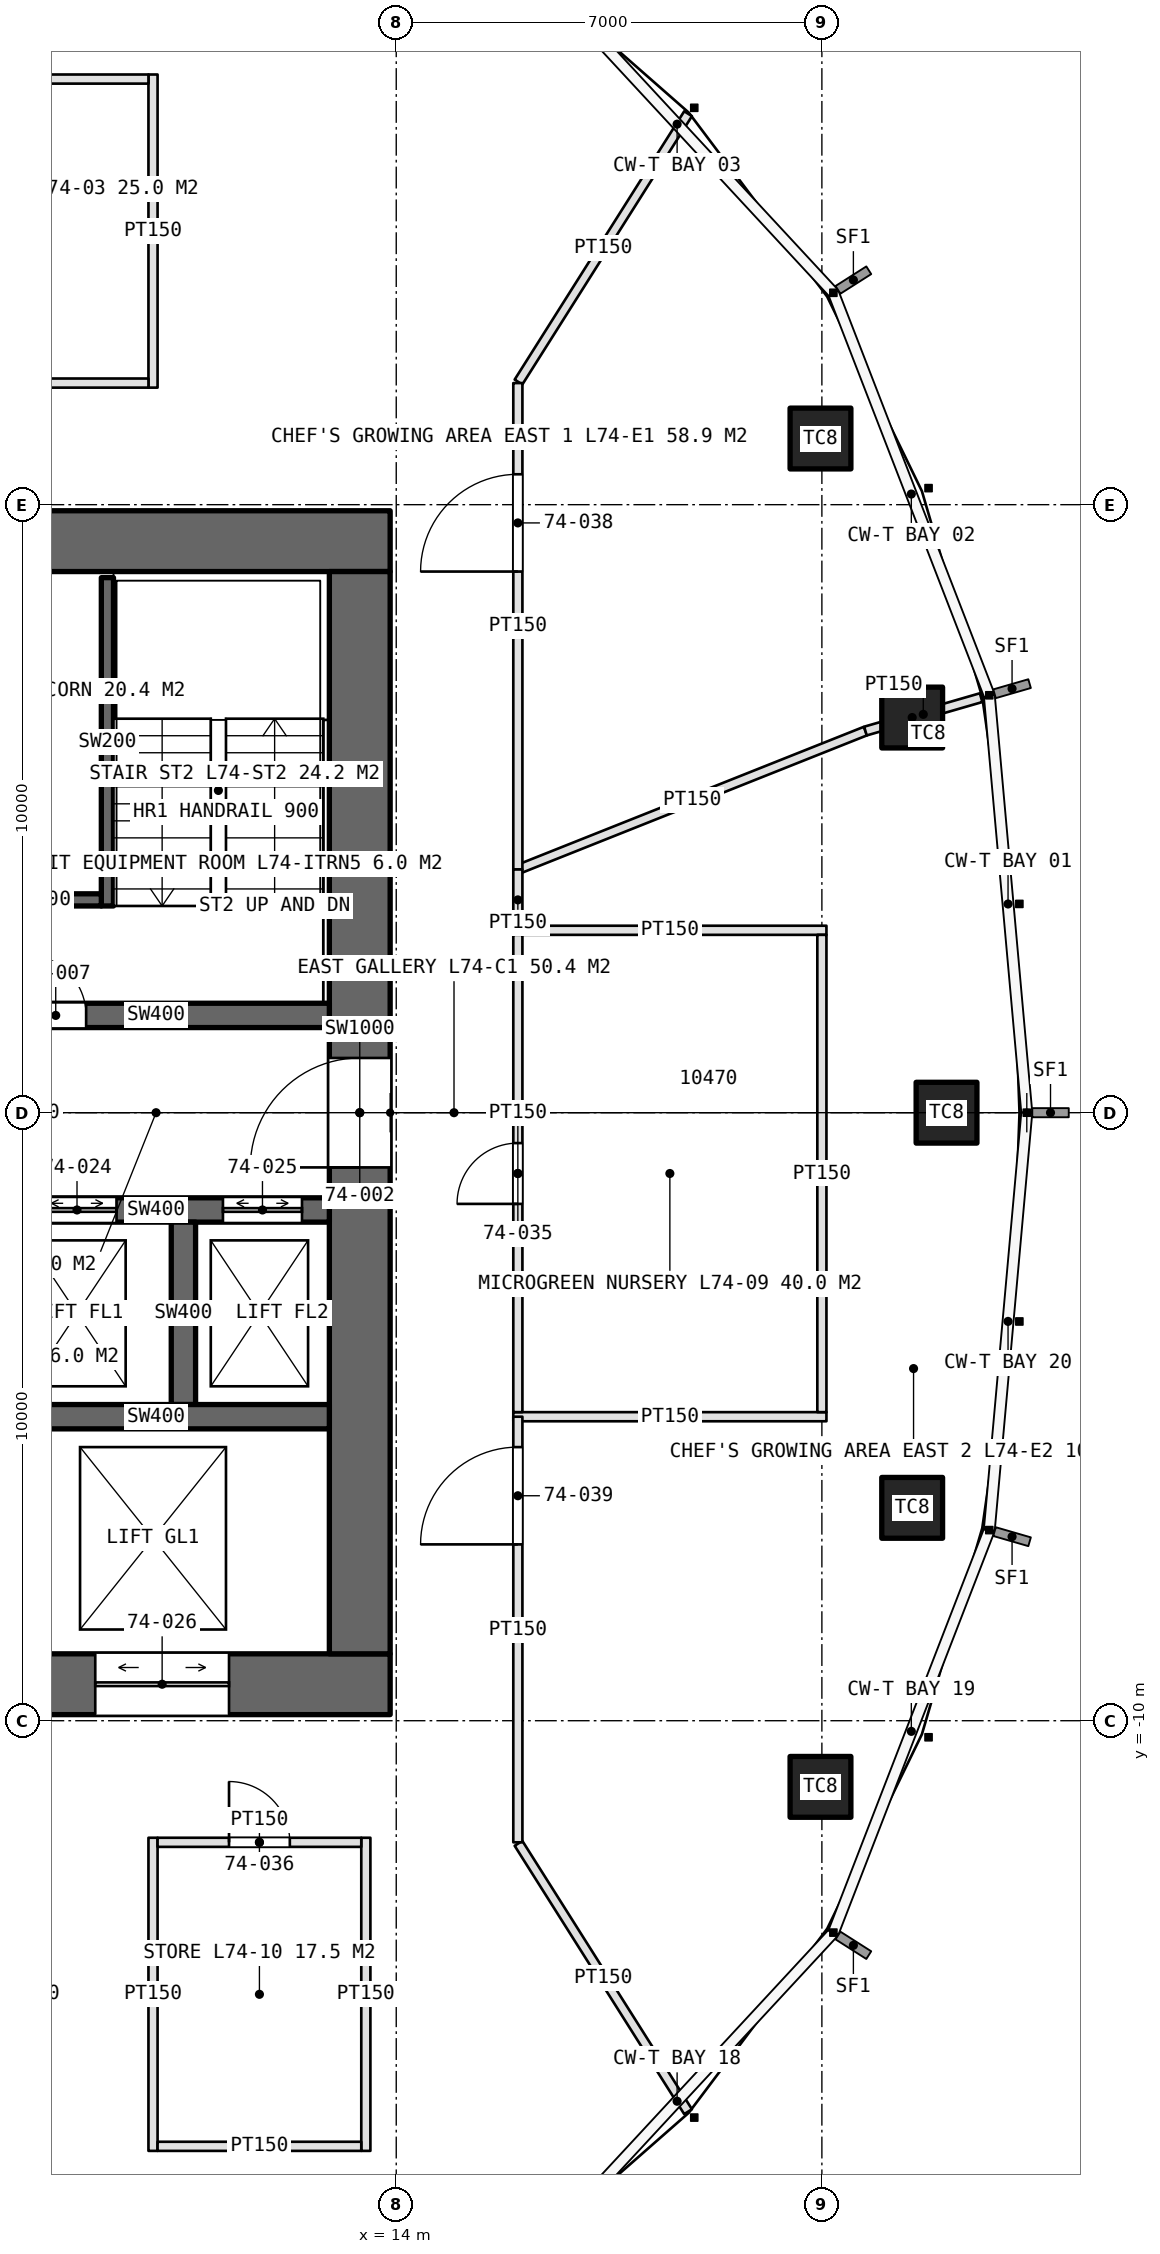
"""IFC4 building model, lengths in metres.
Left out: names, types, materials, properties, quantities, classifications, styles, units other than length and angle.
Written with IfcOpenShell. Run it as: python <this file> out.ifc"""

import sys

from ifc_helpers import new_model, si_unit, direction, frame, frame_2d, origin, origin_2d, place, context, subcontext, project, spatial, rectangle, extrude, element, fill, save


model = new_model("IFC4")
c1 = context("Model", 3, precision=1e-05, world=origin(), true_north=direction((0.0, 1.0)))
c2 = subcontext(c1, "Body", "Model", "MODEL_VIEW")
j1 = project(units=[si_unit("LENGTHUNIT", "METRE"), si_unit("PLANEANGLEUNIT", "RADIAN")], contexts=[c1])
p1 = place(None, origin())
s1 = spatial("IfcSite", under=j1, at=p1, CompositionType="ELEMENT")
p2 = place(p1, origin())
s2 = spatial("IfcBuilding", under=s1, at=p2, CompositionType="ELEMENT")
p3 = place(p2, frame((0.0, 0.0, 330.0)))
s3 = spatial("IfcBuildingStorey", under=s2, at=p3, CompositionType="ELEMENT", Elevation=330.0)
p4 = place(p3, frame((-13.9, -9.4, 0.0), z_axis=(0.0, 0.0, 1.0), x_axis=(1.0, 0.0, 0.0)))
e1 = element("IfcWall", 1, at=p4, inside=s3, PredefinedType="SHEAR", context=c2, shape_type="SweptSolid", body=[
    extrude(rectangle(XDim=27.8, YDim=1.0, at=frame_2d((13.9, 0.0))), origin(), (0.0, 0.0, 1.0), 4.2),
])
p5 = place(p4, frame((22.95, 0.0, 0.0)))
e2 = element("IfcOpeningElement", 2, at=p5, cuts=e1, PredefinedType="OPENING", context=c2, shape_type="SweptSolid", body=[
    extrude(rectangle(XDim=2.2, YDim=2.7, at=frame_2d((1.1, 1.35))), frame((0.0, 0.51, 0.0), z_axis=(0.0, -1.0, 0.0), x_axis=(1.0, 0.0, 0.0)), (0.0, 0.0, 1.0), 1.02),
])
p6 = place(p3, frame((13.9, 9.4, 0.0), z_axis=(0.0, 0.0, 1.0), x_axis=(-1.0, 0.0, 0.0)))
e3 = element("IfcWall", 3, at=p6, inside=s3, PredefinedType="SHEAR", context=c2, shape_type="SweptSolid", body=[
    extrude(rectangle(XDim=27.8, YDim=1.0, at=frame_2d((13.9, 0.0))), origin(), (0.0, 0.0, 1.0), 4.2),
])
p7 = place(p6, frame((23.9, 0.0, 0.0)))
e4 = element("IfcOpeningElement", 4, at=p7, cuts=e3, PredefinedType="OPENING", context=c2, shape_type="SweptSolid", body=[
    extrude(rectangle(XDim=1.0, YDim=2.4, at=frame_2d((0.5, 1.2))), frame((0.0, 0.51, 0.0), z_axis=(0.0, -1.0, 0.0), x_axis=(1.0, 0.0, 0.0)), (0.0, 0.0, 1.0), 1.02),
])
p8 = place(p6, frame((13.0, 0.0, 0.0)))
e5 = element("IfcOpeningElement", 5, at=p8, cuts=e3, PredefinedType="OPENING", context=c2, shape_type="SweptSolid", body=[
    extrude(rectangle(XDim=1.8, YDim=2.4, at=frame_2d((0.9, 1.2))), frame((0.0, 0.51, 0.0), z_axis=(0.0, -1.0, 0.0), x_axis=(1.0, 0.0, 0.0)), (0.0, 0.0, 1.0), 1.02),
])
p9 = place(p3, frame((13.4, -8.9, 0.0), z_axis=(0.0, 0.0, 1.0), x_axis=(0.0, 1.0, 0.0)))
e6 = element("IfcWall", 6, at=p9, inside=s3, PredefinedType="SHEAR", context=c2, shape_type="SweptSolid", body=[
    extrude(rectangle(XDim=17.8, YDim=1.0, at=frame_2d((8.9, 0.0))), origin(), (0.0, 0.0, 1.0), 4.2),
])
p10 = place(p9, frame((8.0, 0.0, 0.0)))
e7 = element("IfcOpeningElement", 7, at=p10, cuts=e6, PredefinedType="OPENING", context=c2, shape_type="SweptSolid", body=[
    extrude(rectangle(XDim=1.8, YDim=2.4, at=frame_2d((0.9, 1.2))), frame((0.0, 0.51, 0.0), z_axis=(0.0, -1.0, 0.0), x_axis=(1.0, 0.0, 0.0)), (0.0, 0.0, 1.0), 1.02),
])
p11 = place(p3, frame((7.2, 1.6, 0.0), z_axis=(0.0, 0.0, 1.0), x_axis=(1.0, 0.0, 0.0)))
e8 = element("IfcWall", 8, at=p11, inside=s3, PredefinedType="SHEAR", context=c2, shape_type="SweptSolid", body=[
    extrude(rectangle(XDim=5.7, YDim=0.4, at=frame_2d((2.85, 0.0))), origin(), (0.0, 0.0, 1.0), 4.2),
])
p12 = place(p11, frame((0.7, 0.0, 0.0)))
e9 = element("IfcOpeningElement", 9, at=p12, cuts=e8, PredefinedType="OPENING", context=c2, shape_type="SweptSolid", body=[
    extrude(rectangle(XDim=1.0, YDim=2.4, at=frame_2d((0.5, 1.2))), frame((0.0, 0.21, 0.0), z_axis=(0.0, -1.0, 0.0), x_axis=(1.0, 0.0, 0.0)), (0.0, 0.0, 1.0), 0.42),
])
p13 = place(p3, frame((7.2, -1.6, 0.0), z_axis=(0.0, 0.0, 1.0), x_axis=(1.0, 0.0, 0.0)))
e10 = element("IfcWall", 10, at=p13, inside=s3, PredefinedType="SHEAR", context=c2, shape_type="SweptSolid", body=[
    extrude(rectangle(XDim=5.7, YDim=0.4, at=frame_2d((2.85, 0.0))), origin(), (0.0, 0.0, 1.0), 4.2),
])
p14 = place(p13, frame((0.9, 0.0, 0.0)))
e11 = element("IfcOpeningElement", 11, at=p14, cuts=e10, PredefinedType="OPENING", context=c2, shape_type="SweptSolid", body=[
    extrude(rectangle(XDim=1.3, YDim=2.4, at=frame_2d((0.65, 1.2))), frame((0.0, 0.21, 0.0), z_axis=(0.0, -1.0, 0.0), x_axis=(1.0, 0.0, 0.0)), (0.0, 0.0, 1.0), 0.42),
])
p15 = place(p13, frame((3.95, 0.0, 0.0)))
e12 = element("IfcOpeningElement", 12, at=p15, cuts=e10, PredefinedType="OPENING", context=c2, shape_type="SweptSolid", body=[
    extrude(rectangle(XDim=1.3, YDim=2.4, at=frame_2d((0.65, 1.2))), frame((0.0, 0.21, 0.0), z_axis=(0.0, -1.0, 0.0), x_axis=(1.0, 0.0, 0.0)), (0.0, 0.0, 1.0), 0.42),
])
p16 = place(p3, frame((10.5, -4.8, 0.0), z_axis=(0.0, 0.0, 1.0), x_axis=(0.0, 1.0, 0.0)))
e13 = element("IfcWall", 13, at=p16, inside=s3, PredefinedType="SHEAR", context=c2, shape_type="SweptSolid", body=[
    extrude(rectangle(XDim=3.0, YDim=0.4, at=frame_2d((1.5, 0.0))), origin(), (0.0, 0.0, 1.0), 4.2),
])
p17 = place(p3, frame((7.2, -5.0, 0.0), z_axis=(0.0, 0.0, 1.0), x_axis=(1.0, 0.0, 0.0)))
e14 = element("IfcWall", 14, at=p17, inside=s3, PredefinedType="SHEAR", context=c2, shape_type="SweptSolid", body=[
    extrude(rectangle(XDim=5.7, YDim=0.4, at=frame_2d((2.85, 0.0))), origin(), (0.0, 0.0, 1.0), 4.2),
])
for number, where, z_axis, x_axis in (
    (15, (23.05, 0.0, 0.0), (0.0, 0.0, 1.0), (1.0, 0.0, 0.0)),
    (16, (22.485, 6.499, 0.0), (0.0, 0.0, 1.0), (1.0, 0.0, 0.0)),
    (17, (20.977, 11.088, 0.0), (0.0, 0.0, 1.0), (1.0, 0.0, 0.0)),
    (18, (20.977, -11.088, 0.0), (0.0, 0.0, 1.0), (1.0, 0.0, 0.0)),
    (19, (22.485, -6.499, 0.0), (0.0, 0.0, 1.0), (1.0, 0.0, 0.0)),
):
    element("IfcColumn", number, at=place(p3, frame(where, z_axis=z_axis, x_axis=x_axis)), inside=s3, PredefinedType="COLUMN", context=c2, shape_type="SweptSolid", body=[
        extrude(rectangle(XDim=1.0, YDim=1.0, at=origin_2d()), origin(), (0.0, 0.0, 1.0), 4.2),
    ])
p18 = place(p3, frame((9.25, 3.4, 0.0), z_axis=(0.0, 0.0, 1.0), x_axis=(0.0, 1.0, 0.0)))
e20 = element("IfcWall", 20, at=p18, inside=s3, PredefinedType="SOLIDWALL", context=c2, shape_type="SweptSolid", body=[
    extrude(rectangle(XDim=5.4, YDim=0.2, at=frame_2d((2.7, 0.0))), origin(), (0.0, 0.0, 1.0), 4.2),
])
p19 = place(p3, frame((9.15, 3.5, 0.0), z_axis=(0.0, 0.0, 1.0), x_axis=(-1.0, 0.0, 0.0)))
e21 = element("IfcWall", 21, at=p19, inside=s3, PredefinedType="SOLIDWALL", context=c2, shape_type="SweptSolid", body=[
    extrude(rectangle(XDim=1.95, YDim=0.2, at=frame_2d((0.975, 0.0))), origin(), (0.0, 0.0, 1.0), 4.2),
])
p20 = place(p3, frame((10.0, 11.925, 0.0), z_axis=(0.0, 0.0, 1.0), x_axis=(0.0, 1.0, 0.0)))
e22 = element("IfcWall", 22, at=p20, inside=s3, PredefinedType="PARTITIONING", context=c2, shape_type="SweptSolid", body=[
    extrude(rectangle(XDim=5.15, YDim=0.15, at=frame_2d((2.575, 0.0))), origin(), (0.0, 0.0, 1.0), 3.0),
])
p21 = place(p3, frame((5.075, 12.0, 0.0), z_axis=(0.0, 0.0, 1.0), x_axis=(1.0, 0.0, 0.0)))
e23 = element("IfcWall", 23, at=p21, inside=s3, PredefinedType="PARTITIONING", context=c2, shape_type="SweptSolid", body=[
    extrude(rectangle(XDim=4.85, YDim=0.15, at=frame_2d((2.425, 0.0))), origin(), (0.0, 0.0, 1.0), 3.0),
])
p22 = place(p21, frame((1.925, 0.0, 0.0)))
e24 = element("IfcOpeningElement", 24, at=p22, cuts=e23, PredefinedType="OPENING", context=c2, shape_type="SweptSolid", body=[
    extrude(rectangle(XDim=1.0, YDim=2.2, at=frame_2d((0.5, 1.1))), frame((0.0, 0.085, 0.0), z_axis=(0.0, -1.0, 0.0), x_axis=(1.0, 0.0, 0.0)), (0.0, 0.0, 1.0), 0.17),
])
p23 = place(p3, frame((5.075, 17.0, 0.0), z_axis=(0.0, 0.0, 1.0), x_axis=(1.0, 0.0, 0.0)))
e25 = element("IfcWall", 25, at=p23, inside=s3, PredefinedType="PARTITIONING", context=c2, shape_type="SweptSolid", body=[
    extrude(rectangle(XDim=4.85, YDim=0.15, at=frame_2d((2.425, 0.0))), origin(), (0.0, 0.0, 1.0), 3.0),
])
for number, where, z_axis, x_axis in (
    (26, (15.925, -5.0, 0.0), (0.0, 0.0, 1.0), (1.0, 0.0, 0.0)),
    (27, (15.925, 3.0, 0.0), (0.0, 0.0, 1.0), (1.0, 0.0, 0.0)),
):
    element("IfcWall", number, at=place(p3, frame(where, z_axis=z_axis, x_axis=x_axis)), inside=s3, PredefinedType="PARTITIONING", context=c2, shape_type="SweptSolid", body=[
        extrude(rectangle(XDim=5.15, YDim=0.15, at=frame_2d((2.575, 0.0))), origin(), (0.0, 0.0, 1.0), 3.0),
    ])
p24 = place(p3, frame((16.0, -4.925, 0.0), z_axis=(0.0, 0.0, 1.0), x_axis=(0.0, 1.0, 0.0)))
e28 = element("IfcWall", 28, at=p24, inside=s3, PredefinedType="PARTITIONING", context=c2, shape_type="SweptSolid", body=[
    extrude(rectangle(XDim=7.85, YDim=0.15, at=frame_2d((3.925, 0.0))), origin(), (0.0, 0.0, 1.0), 3.0),
])
p25 = place(p24, frame((3.425, 0.0, 0.0)))
e29 = element("IfcOpeningElement", 29, at=p25, cuts=e28, PredefinedType="OPENING", context=c2, shape_type="SweptSolid", body=[
    extrude(rectangle(XDim=1.0, YDim=2.2, at=frame_2d((0.5, 1.1))), frame((0.0, 0.085, 0.0), z_axis=(0.0, -1.0, 0.0), x_axis=(1.0, 0.0, 0.0)), (0.0, 0.0, 1.0), 0.17),
])
p26 = place(p3, frame((21.0, -4.925, 0.0), z_axis=(0.0, 0.0, 1.0), x_axis=(0.0, 1.0, 0.0)))
e30 = element("IfcWall", 30, at=p26, inside=s3, PredefinedType="PARTITIONING", context=c2, shape_type="SweptSolid", body=[
    extrude(rectangle(XDim=7.85, YDim=0.15, at=frame_2d((3.925, 0.0))), origin(), (0.0, 0.0, 1.0), 3.0),
])
for number, where, z_axis, x_axis in (
    (31, (10.0, -11.925, 0.0), (0.0, 0.0, 1.0), (0.0, -1.0, 0.0)),
    (32, (13.5, -11.925, 0.0), (0.0, 0.0, 1.0), (0.0, -1.0, 0.0)),
):
    element("IfcWall", number, at=place(p3, frame(where, z_axis=z_axis, x_axis=x_axis)), inside=s3, PredefinedType="PARTITIONING", context=c2, shape_type="SweptSolid", body=[
        extrude(rectangle(XDim=5.15, YDim=0.15, at=frame_2d((2.575, 0.0))), origin(), (0.0, 0.0, 1.0), 3.0),
    ])
p27 = place(p3, frame((10.075, -12.0, 0.0), z_axis=(0.0, 0.0, 1.0), x_axis=(1.0, 0.0, 0.0)))
e33 = element("IfcWall", 33, at=p27, inside=s3, PredefinedType="PARTITIONING", context=c2, shape_type="SweptSolid", body=[
    extrude(rectangle(XDim=3.35, YDim=0.15, at=frame_2d((1.675, 0.0))), origin(), (0.0, 0.0, 1.0), 3.0),
])
p28 = place(p27, frame((1.175, 0.0, 0.0)))
e34 = element("IfcOpeningElement", 34, at=p28, cuts=e33, PredefinedType="OPENING", context=c2, shape_type="SweptSolid", body=[
    extrude(rectangle(XDim=1.0, YDim=2.2, at=frame_2d((0.5, 1.1))), frame((0.0, 0.085, 0.0), z_axis=(0.0, -1.0, 0.0), x_axis=(1.0, 0.0, 0.0)), (0.0, 0.0, 1.0), 0.17),
])
p29 = place(p3, frame((10.075, -17.0, 0.0), z_axis=(0.0, 0.0, 1.0), x_axis=(1.0, 0.0, 0.0)))
e35 = element("IfcWall", 35, at=p29, inside=s3, PredefinedType="PARTITIONING", context=c2, shape_type="SweptSolid", body=[
    extrude(rectangle(XDim=3.35, YDim=0.15, at=frame_2d((1.675, 0.0))), origin(), (0.0, 0.0, 1.0), 3.0),
])
for number, where, z_axis, x_axis in (
    (36, (16.011, -12.017, 0.0), (0.0, 0.0, 1.0), (0.534, -0.845, 0.0)),
    (37, (16.011, 12.017, 0.0), (0.0, 0.0, 1.0), (0.534, 0.845, 0.0)),
):
    element("IfcWall", number, at=place(p3, frame(where, z_axis=z_axis, x_axis=x_axis)), inside=s3, PredefinedType="PARTITIONING", context=c2, shape_type="SweptSolid", body=[
        extrude(rectangle(XDim=5.22, YDim=0.15, at=frame_2d((2.61, 0.0))), origin(), (0.0, 0.0, 1.0), 3.0),
    ])
p30 = place(p3, frame((16.02, 4.008, 0.0), z_axis=(0.0, 0.0, 1.0), x_axis=(0.929035834071, 0.36998975528, 0.0)))
e38 = element("IfcWall", 38, at=p30, inside=s3, PredefinedType="PARTITIONING", context=c2, shape_type="SweptSolid", body=[
    extrude(rectangle(XDim=6.131, YDim=0.15, at=frame_2d((3.066, 0.0))), origin(), (0.0, 0.0, 1.0), 3.0),
])
p31 = place(p3, frame((21.716, 6.277, 0.0), z_axis=(0.0, 0.0, 1.0), x_axis=(0.960705414675, 0.277570002366, 0.0)))
e39 = element("IfcWall", 39, at=p31, inside=s3, PredefinedType="PARTITIONING", context=c2, shape_type="SweptSolid", body=[
    extrude(rectangle(XDim=1.98, YDim=0.15, at=frame_2d((0.99, 0.0))), origin(), (0.0, 0.0, 1.0), 3.0),
])
p32 = place(p3, frame((16.0, 4.0, 0.0), z_axis=(0.0, 0.0, 1.0), x_axis=(0.0, 1.0, 0.0)))
e40 = element("IfcWall", 40, at=p32, inside=s3, PredefinedType="PARTITIONING", context=c2, shape_type="SweptSolid", body=[
    extrude(rectangle(XDim=8.0, YDim=0.15, at=frame_2d((4.0, 0.0))), origin(), (0.0, 0.0, 1.0), 3.0),
])
p33 = place(p32, frame((4.9, 0.0, 0.0)))
e41 = element("IfcOpeningElement", 41, at=p33, cuts=e40, PredefinedType="OPENING", context=c2, shape_type="SweptSolid", body=[
    extrude(rectangle(XDim=1.6, YDim=2.4, at=frame_2d((0.8, 1.2))), frame((0.0, 0.085, 0.0), z_axis=(0.0, -1.0, 0.0), x_axis=(1.0, 0.0, 0.0)), (0.0, 0.0, 1.0), 0.17),
])
p34 = place(p3, frame((16.0, -12.0, 0.0), z_axis=(0.0, 0.0, 1.0), x_axis=(0.0, 1.0, 0.0)))
e42 = element("IfcWall", 42, at=p34, inside=s3, PredefinedType="PARTITIONING", context=c2, shape_type="SweptSolid", body=[
    extrude(rectangle(XDim=7.0, YDim=0.15, at=frame_2d((3.5, 0.0))), origin(), (0.0, 0.0, 1.0), 3.0),
])
p35 = place(p34, frame((4.9, 0.0, 0.0)))
e43 = element("IfcOpeningElement", 43, at=p35, cuts=e42, PredefinedType="OPENING", context=c2, shape_type="SweptSolid", body=[
    extrude(rectangle(XDim=1.6, YDim=2.4, at=frame_2d((0.8, 1.2))), frame((0.0, 0.085, 0.0), z_axis=(0.0, -1.0, 0.0), x_axis=(1.0, 0.0, 0.0)), (0.0, 0.0, 1.0), 0.17),
])
p36 = place(p3, frame((16.0, 3.0, 0.0), z_axis=(0.0, 0.0, 1.0), x_axis=(0.0, 1.0, 0.0)))
e44 = element("IfcWall", 44, at=p36, inside=s3, PredefinedType="PARTITIONING", context=c2, shape_type="SweptSolid", body=[
    extrude(rectangle(XDim=1.0, YDim=0.15, at=frame_2d((0.5, 0.0))), origin(), (0.0, 0.0, 1.0), 3.0),
])
p37 = place(p10, origin())
e45 = element("IfcDoor", 45, at=p37, inside=s3, OperationType="DOUBLE_DOOR_SINGLE_SWING", PredefinedType="DOOR", context=c2, shape_type="SweptSolid", body=[
    extrude(rectangle(XDim=1.8, YDim=2.4, at=frame_2d((0.9, 1.2))), frame((0.0, 0.025, 0.0), z_axis=(0.0, -1.0, 0.0), x_axis=(1.0, 0.0, 0.0)), (0.0, 0.0, 1.0), 0.05),
])
fill(e7, e45)
p38 = place(p12, origin())
e46 = element("IfcDoor", 46, at=p38, inside=s3, OperationType="SINGLE_SWING_LEFT", PredefinedType="DOOR", context=c2, shape_type="SweptSolid", body=[
    extrude(rectangle(XDim=1.0, YDim=2.4, at=frame_2d((0.5, 1.2))), frame((0.0, 0.025, 0.0), z_axis=(0.0, -1.0, 0.0), x_axis=(1.0, 0.0, 0.0)), (0.0, 0.0, 1.0), 0.05),
])
fill(e9, e46)
p39 = place(p14, origin())
e47 = element("IfcDoor", 47, at=p39, inside=s3, OperationType="DOUBLE_DOOR_SLIDING", PredefinedType="DOOR", context=c2, shape_type="SweptSolid", body=[
    extrude(rectangle(XDim=1.3, YDim=2.4, at=frame_2d((0.65, 1.2))), frame((0.0, 0.025, 0.0), z_axis=(0.0, -1.0, 0.0), x_axis=(1.0, 0.0, 0.0)), (0.0, 0.0, 1.0), 0.05),
])
fill(e11, e47)
p40 = place(p15, origin())
e48 = element("IfcDoor", 48, at=p40, inside=s3, OperationType="DOUBLE_DOOR_SLIDING", PredefinedType="DOOR", context=c2, shape_type="SweptSolid", body=[
    extrude(rectangle(XDim=1.3, YDim=2.4, at=frame_2d((0.65, 1.2))), frame((0.0, 0.025, 0.0), z_axis=(0.0, -1.0, 0.0), x_axis=(1.0, 0.0, 0.0)), (0.0, 0.0, 1.0), 0.05),
])
fill(e12, e48)
p41 = place(p5, origin())
e49 = element("IfcDoor", 49, at=p41, inside=s3, OperationType="DOUBLE_DOOR_SLIDING", PredefinedType="DOOR", context=c2, shape_type="SweptSolid", body=[
    extrude(rectangle(XDim=2.2, YDim=2.7, at=frame_2d((1.1, 1.35))), frame((0.0, 0.025, 0.0), z_axis=(0.0, -1.0, 0.0), x_axis=(1.0, 0.0, 0.0)), (0.0, 0.0, 1.0), 0.05),
])
fill(e2, e49)
p42 = place(p25, origin())
e50 = element("IfcDoor", 50, at=p42, inside=s3, OperationType="SINGLE_SWING_LEFT", PredefinedType="DOOR", context=c2, shape_type="SweptSolid", body=[
    extrude(rectangle(XDim=1.0, YDim=2.2, at=frame_2d((0.5, 1.1))), frame((0.0, 0.025, 0.0), z_axis=(0.0, -1.0, 0.0), x_axis=(1.0, 0.0, 0.0)), (0.0, 0.0, 1.0), 0.05),
])
fill(e29, e50)
p43 = place(p28, origin())
e51 = element("IfcDoor", 51, at=p43, inside=s3, OperationType="SINGLE_SWING_LEFT", PredefinedType="DOOR", context=c2, shape_type="SweptSolid", body=[
    extrude(rectangle(XDim=1.0, YDim=2.2, at=frame_2d((0.5, 1.1))), frame((0.0, 0.025, 0.0), z_axis=(0.0, -1.0, 0.0), x_axis=(1.0, 0.0, 0.0)), (0.0, 0.0, 1.0), 0.05),
])
fill(e34, e51)
p44 = place(p33, origin())
e52 = element("IfcDoor", 52, at=p44, inside=s3, OperationType="DOUBLE_DOOR_SINGLE_SWING", PredefinedType="DOOR", context=c2, shape_type="SweptSolid", body=[
    extrude(rectangle(XDim=1.6, YDim=2.4, at=frame_2d((0.8, 1.2))), frame((0.0, 0.025, 0.0), z_axis=(0.0, -1.0, 0.0), x_axis=(1.0, 0.0, 0.0)), (0.0, 0.0, 1.0), 0.05),
])
fill(e41, e52)
p45 = place(p35, origin())
e53 = element("IfcDoor", 53, at=p45, inside=s3, OperationType="DOUBLE_DOOR_SINGLE_SWING", PredefinedType="DOOR", context=c2, shape_type="SweptSolid", body=[
    extrude(rectangle(XDim=1.6, YDim=2.4, at=frame_2d((0.8, 1.2))), frame((0.0, 0.025, 0.0), z_axis=(0.0, -1.0, 0.0), x_axis=(1.0, 0.0, 0.0)), (0.0, 0.0, 1.0), 0.05),
])
fill(e43, e53)
save(model, sys.argv[1])
